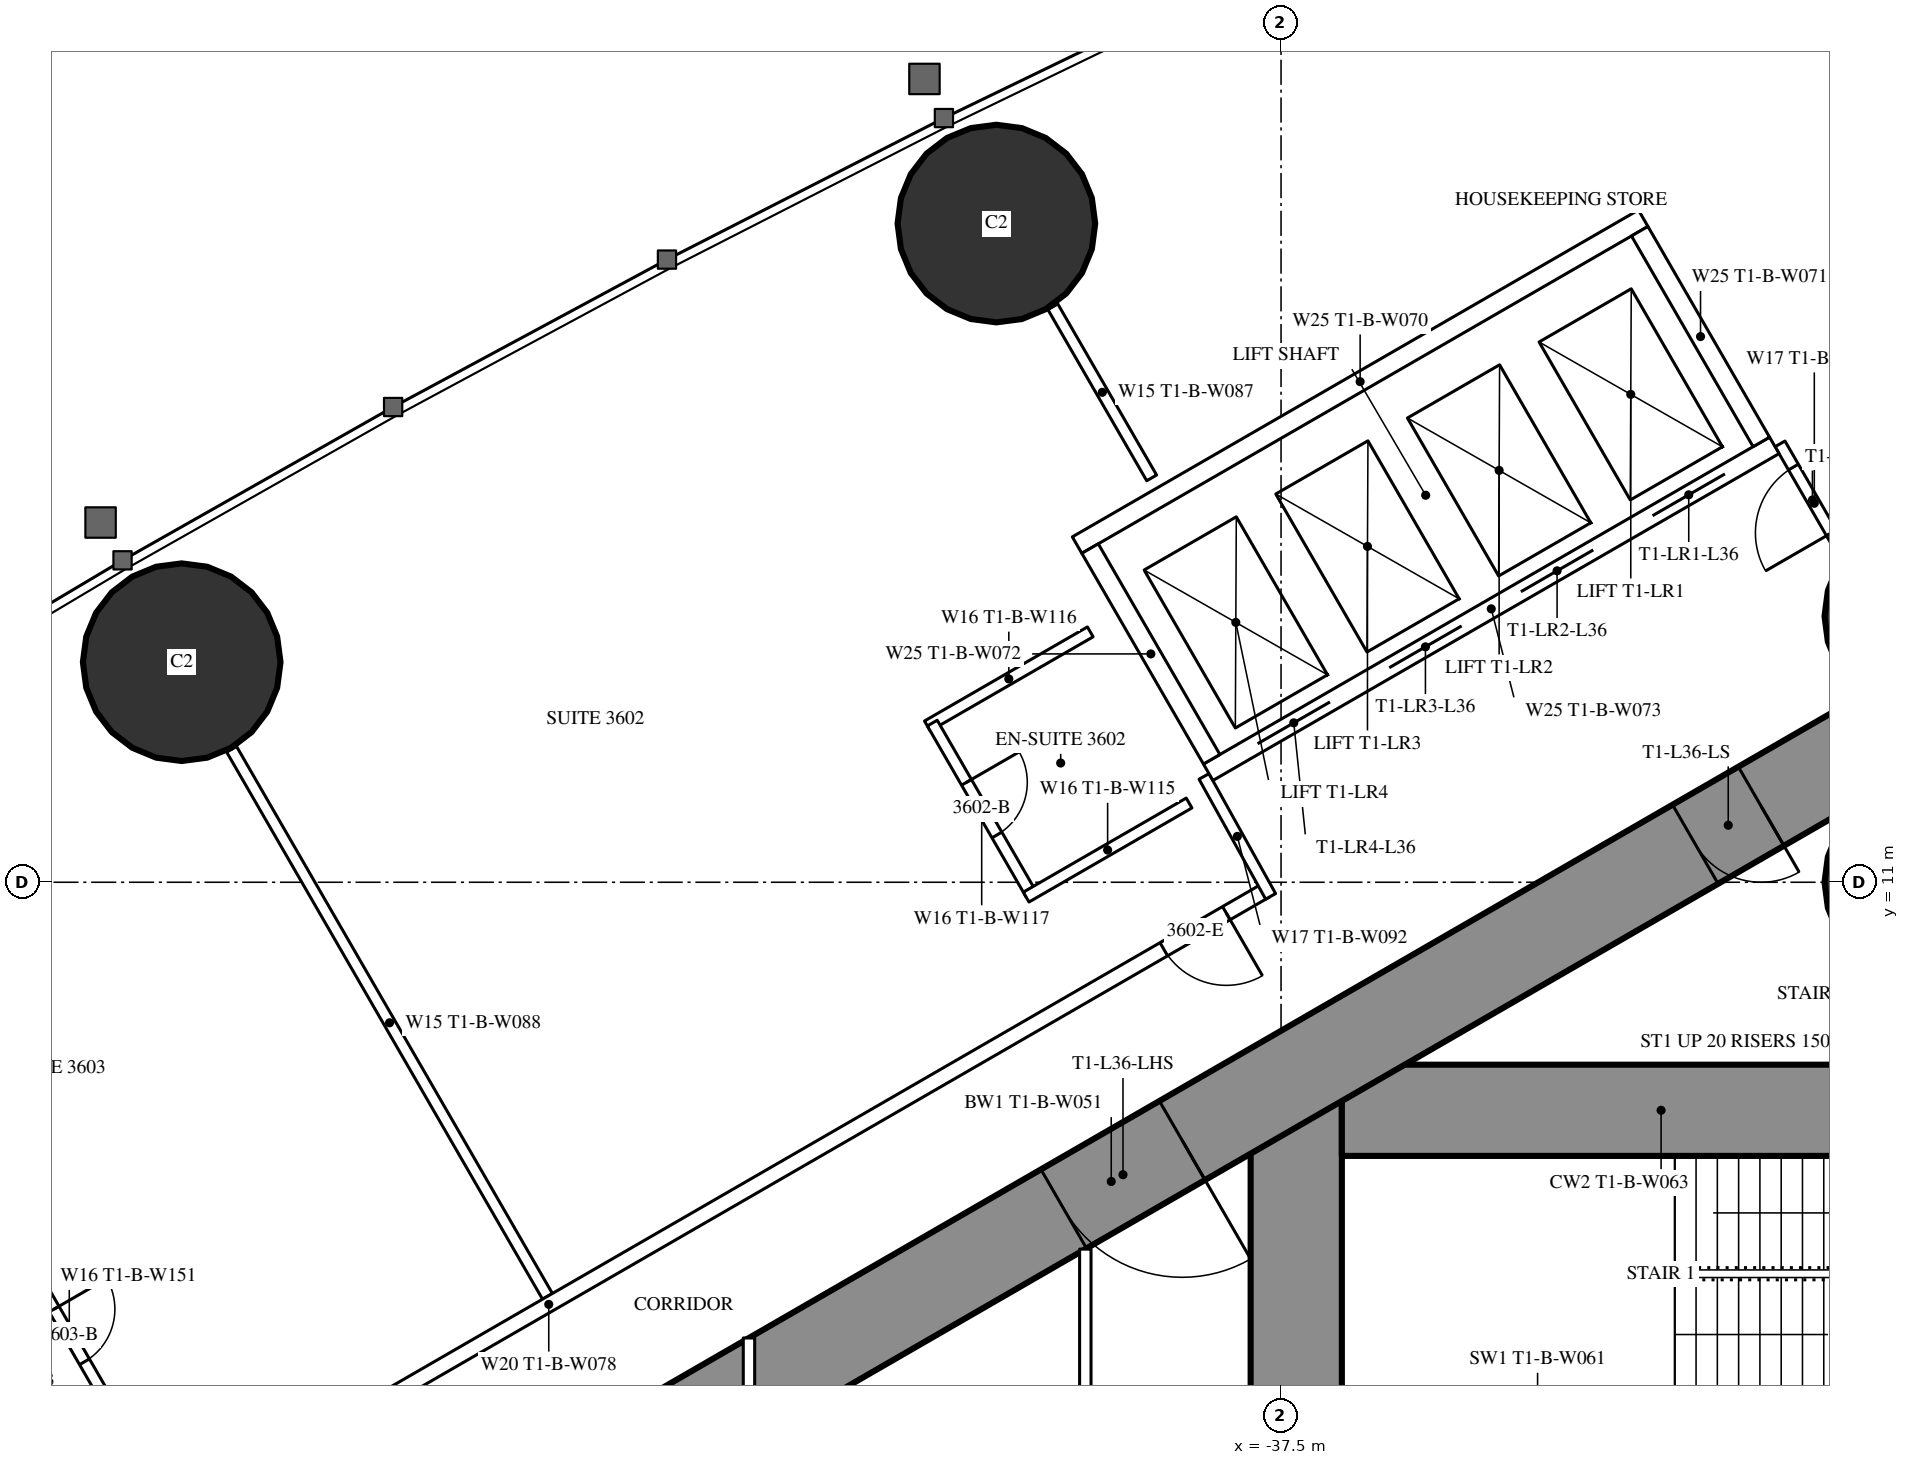
"""IFC4 building model, lengths in metres.
Left out: names, types, materials, properties, quantities, classifications, styles, units other than length and angle.
Written with IfcOpenShell. Run it as: python <this file> out.ifc"""

import sys

from ifc_helpers import new_model, si_unit, direction, frame, frame_2d, origin, origin_2d, place, context, subcontext, project, spatial, rectangle, hollow_circle, extrude, element, fill, save


model = new_model("IFC4")
c1 = context("Model", 3, precision=1e-05, world=origin(), true_north=direction((0.0, 1.0)))
c2 = subcontext(c1, "Body", "Model", "MODEL_VIEW")
j1 = project(units=[si_unit("LENGTHUNIT", "METRE"), si_unit("PLANEANGLEUNIT", "RADIAN")], contexts=[c1])
p1 = place(None, origin())
s1 = spatial("IfcSite", under=j1, at=p1, CompositionType="ELEMENT")
p2 = place(p1, origin())
s2 = spatial("IfcBuilding", under=s1, at=p2, CompositionType="ELEMENT")
p3 = place(p2, frame((0.0, 0.0, 136.1)))
s3 = spatial("IfcBuildingStorey", under=s2, at=p3, CompositionType="ELEMENT", Elevation=136.1)
for number, where, z_axis, x_axis in (
    (1, (-29.05, 11.0, 0.0), (0.0, 0.0, 1.0), (1.0, 0.0, 0.0)),
    (2, (-29.05, 14.5, 0.0), (0.0, 0.0, 1.0), (1.0, 0.0, 0.0)),
    (3, (-41.245, 19.666, 0.0), (0.0, 0.0, 1.0), (1.0, 0.0, 0.0)),
    (4, (-51.963, 13.895, 0.0), (0.0, 0.0, 1.0), (1.0, 0.0, 0.0)),
):
    element("IfcColumn", number, at=place(p3, frame(where, z_axis=z_axis, x_axis=x_axis)), inside=s3, PredefinedType="COLUMN", context=c2, shape_type="SweptSolid", body=[
        extrude(hollow_circle(Radius=1.3, WallThickness=0.1, at=origin_2d()), origin(), (0.0, 0.0, 1.0), 3.5),
    ])
p4 = place(p3, frame((-37.3, 8.6, 0.0), z_axis=(0.0, 0.0, 1.0), x_axis=(0.0, -1.0, 0.0)))
e5 = element("IfcWall", 5, at=p4, inside=s3, PredefinedType="SHEAR", context=c2, shape_type="SweptSolid", body=[
    extrude(rectangle(XDim=17.2, YDim=1.2, at=frame_2d((8.6, 0.0))), origin(), (0.0, 0.0, 1.0), 3.5),
])
p5 = place(p4, frame((7.7, 0.0, 0.0)))
e6 = element("IfcOpeningElement", 6, at=p5, cuts=e5, PredefinedType="OPENING", context=c2, shape_type="SweptSolid", body=[
    extrude(rectangle(XDim=1.8, YDim=2.2, at=frame_2d((0.9, 1.1))), frame((0.0, 0.61, 0.0), z_axis=(0.0, -1.0, 0.0), x_axis=(1.0, 0.0, 0.0)), (0.0, 0.0, 1.0), 1.22),
])
p6 = place(p3, frame((-28.3, 8.0, 0.0), z_axis=(0.0, 0.0, 1.0), x_axis=(-1.0, 0.0, 0.0)))
e7 = element("IfcWall", 7, at=p6, inside=s3, PredefinedType="SHEAR", context=c2, shape_type="SweptSolid", body=[
    extrude(rectangle(XDim=8.4, YDim=1.2, at=frame_2d((4.2, 0.0))), origin(), (0.0, 0.0, 1.0), 3.5),
])
p7 = place(p6, frame((0.25, 0.0, 0.0)))
e8 = element("IfcOpeningElement", 8, at=p7, cuts=e7, PredefinedType="OPENING", context=c2, shape_type="SweptSolid", body=[
    extrude(rectangle(XDim=1.0, YDim=2.2, at=frame_2d((0.5, 1.1))), frame((0.0, 0.61, 0.0), z_axis=(0.0, -1.0, 0.0), x_axis=(1.0, 0.0, 0.0)), (0.0, 0.0, 1.0), 1.22),
])
p8 = place(p3, frame((-27.2, 14.3, 0.0), z_axis=(0.0, 0.0, 1.0), x_axis=(-0.866026593062, -0.499997940104, 0.0)))
e9 = element("IfcWall", 9, at=p8, inside=s3, PredefinedType="SHEAR", context=c2, shape_type="SweptSolid", body=[
    extrude(rectangle(XDim=28.946, YDim=1.2, at=frame_2d((14.473, 0.0))), origin(), (0.0, 0.0, 1.0), 3.5),
])
p9 = place(p8, frame((4.6, 0.0, 0.0)))
e10 = element("IfcOpeningElement", 10, at=p9, cuts=e9, PredefinedType="OPENING", context=c2, shape_type="SweptSolid", body=[
    extrude(rectangle(XDim=1.0, YDim=2.2, at=frame_2d((0.5, 1.1))), frame((0.0, 0.61, 0.0), z_axis=(0.0, -1.0, 0.0), x_axis=(1.0, 0.0, 0.0)), (0.0, 0.0, 1.0), 1.22),
])
p10 = place(p8, frame((13.395, 0.0, 0.0)))
e11 = element("IfcOpeningElement", 11, at=p10, cuts=e9, PredefinedType="OPENING", context=c2, shape_type="SweptSolid", body=[
    extrude(rectangle(XDim=1.8, YDim=2.2, at=frame_2d((0.9, 1.1))), frame((0.0, 0.61, 0.0), z_axis=(0.0, -1.0, 0.0), x_axis=(1.0, 0.0, 0.0)), (0.0, 0.0, 1.0), 1.22),
])
p11 = place(p3, frame((-47.151, 5.552, 0.0), z_axis=(0.0, 0.0, 1.0), x_axis=(-0.500003012045, 0.866023664773, 0.0)))
e12 = element("IfcWall", 12, at=p11, inside=s3, PredefinedType="PARTITIONING", context=c2, shape_type="SweptSolid", body=[
    extrude(rectangle(XDim=8.311, YDim=0.15, at=frame_2d((4.156, 0.0))), origin(), (0.0, 0.0, 1.0), 2.2),
])
p12 = place(p3, frame((-39.202, 16.32, 0.0), z_axis=(0.0, 0.0, 1.0), x_axis=(-0.499947391036, 0.866055775454, 0.0)))
e13 = element("IfcWall", 13, at=p12, inside=s3, PredefinedType="PARTITIONING", context=c2, shape_type="SweptSolid", body=[
    extrude(rectangle(XDim=2.599, YDim=0.15, at=frame_2d((1.3, 0.0))), origin(), (0.0, 0.0, 1.0), 3.25),
])
p13 = place(p3, frame((-37.7, 10.894, 0.0), z_axis=(0.0, 0.0, 1.0), x_axis=(-0.866027905338, -0.499995667157, 0.0)))
e14 = element("IfcWall", 14, at=p13, inside=s3, PredefinedType="PARTITIONING", context=c2, shape_type="SweptSolid", body=[
    extrude(rectangle(XDim=21.787, YDim=0.2, at=frame_2d((10.894, 0.0))), origin(), (0.0, 0.0, 1.0), 3.25),
])
p14 = place(p13, frame((17.711, 0.0, 0.0)))
e15 = element("IfcOpeningElement", 15, at=p14, cuts=e14, PredefinedType="OPENING", context=c2, shape_type="SweptSolid", body=[
    extrude(rectangle(XDim=0.95, YDim=2.2, at=frame_2d((0.475, 1.1))), frame((0.0, 0.11, 0.0), z_axis=(0.0, -1.0, 0.0), x_axis=(1.0, 0.0, 0.0)), (0.0, 0.0, 1.0), 0.22),
])
p15 = place(p13, frame((19.399, 0.0, 0.0)))
e16 = element("IfcOpeningElement", 16, at=p15, cuts=e14, PredefinedType="OPENING", context=c2, shape_type="SweptSolid", body=[
    extrude(rectangle(XDim=1.8, YDim=2.2, at=frame_2d((0.9, 1.1))), frame((0.0, 0.11, 0.0), z_axis=(0.0, -1.0, 0.0), x_axis=(1.0, 0.0, 0.0)), (0.0, 0.0, 1.0), 0.22),
])
p16 = place(p13, frame((0.6, 0.0, 0.0)))
e17 = element("IfcOpeningElement", 17, at=p16, cuts=e14, PredefinedType="OPENING", context=c2, shape_type="SweptSolid", body=[
    extrude(rectangle(XDim=0.95, YDim=2.2, at=frame_2d((0.475, 1.1))), frame((0.0, 0.11, 0.0), z_axis=(0.0, -1.0, 0.0), x_axis=(1.0, 0.0, 0.0)), (0.0, 0.0, 1.0), 0.22),
])
p17 = place(p3, frame((-38.513, 12.392, 0.0), z_axis=(0.0, 0.0, 1.0), x_axis=(0.485585508183, -0.874189175317, 0.0)))
e18 = element("IfcWall", 18, at=p17, inside=s3, PredefinedType="PARTITIONING", context=c2, shape_type="SweptSolid", body=[
    extrude(rectangle(XDim=1.805, YDim=0.15, at=frame_2d((0.902, 0.0))), origin(), (0.0, 0.0, 1.0), 3.25),
])
p18 = place(p3, frame((-30.033, 15.205, 0.0), z_axis=(0.0, 0.0, 1.0), x_axis=(-0.499980071345, 0.866036909293, 0.0)))
e19 = element("IfcWall", 19, at=p18, inside=s3, PredefinedType="PARTITIONING", context=c2, shape_type="SweptSolid", body=[
    extrude(rectangle(XDim=1.805, YDim=0.15, at=frame_2d((0.902, 0.0))), origin(), (0.0, 0.0, 1.0), 2.2),
])
p19 = place(p18, frame((0.452, 0.0, 0.0)))
e20 = element("IfcOpeningElement", 20, at=p19, cuts=e19, PredefinedType="OPENING", context=c2, shape_type="SweptSolid", body=[
    extrude(rectangle(XDim=1.0, YDim=2.2, at=frame_2d((0.5, 1.1))), frame((0.0, 0.085, 0.0), z_axis=(0.0, -1.0, 0.0), x_axis=(1.0, 0.0, 0.0)), (0.0, 0.0, 1.0), 0.17),
])
p20 = place(p3, frame((-52.792, 3.912, 0.0), z_axis=(0.0, 0.0, 1.0), x_axis=(-0.500006934395, 0.866021400173, 0.0)))
e21 = element("IfcWall", 21, at=p20, inside=s3, PredefinedType="PARTITIONING", context=c2, shape_type="SweptSolid", body=[
    extrude(rectangle(XDim=2.6, YDim=0.15, at=frame_2d((1.3, 0.0))), origin(), (0.0, 0.0, 1.0), 3.25),
])
p21 = place(p20, frame((0.9, 0.0, 0.0)))
e22 = element("IfcOpeningElement", 22, at=p21, cuts=e21, PredefinedType="OPENING", context=c2, shape_type="SweptSolid", body=[
    extrude(rectangle(XDim=0.8, YDim=2.2, at=frame_2d((0.4, 1.1))), frame((0.0, 0.085, 0.0), z_axis=(0.0, -1.0, 0.0), x_axis=(1.0, 0.0, 0.0)), (0.0, 0.0, 1.0), 0.17),
])
p22 = place(p3, frame((-40.01, 14.294, 0.0), z_axis=(0.0, 0.0, 1.0), x_axis=(-0.866031185235, -0.4999899861, 0.0)))
e23 = element("IfcWall", 23, at=p22, inside=s3, PredefinedType="PARTITIONING", context=c2, shape_type="SweptSolid", body=[
    extrude(rectangle(XDim=2.475, YDim=0.15, at=frame_2d((1.238, 0.0))), origin(), (0.0, 0.0, 1.0), 3.25),
])
p23 = place(p3, frame((-40.788, 10.843, 0.0), z_axis=(0.0, 0.0, 1.0), x_axis=(-0.500006934395, 0.866021400173, 0.0)))
e24 = element("IfcWall", 24, at=p23, inside=s3, PredefinedType="PARTITIONING", context=c2, shape_type="SweptSolid", body=[
    extrude(rectangle(XDim=2.6, YDim=0.15, at=frame_2d((1.3, 0.0))), origin(), (0.0, 0.0, 1.0), 3.25),
])
p24 = place(p23, frame((0.9, 0.0, 0.0)))
e25 = element("IfcOpeningElement", 25, at=p24, cuts=e24, PredefinedType="OPENING", context=c2, shape_type="SweptSolid", body=[
    extrude(rectangle(XDim=0.8, YDim=2.2, at=frame_2d((0.4, 1.1))), frame((0.0, 0.085, 0.0), z_axis=(0.0, -1.0, 0.0), x_axis=(1.0, 0.0, 0.0)), (0.0, 0.0, 1.0), 0.17),
])
p25 = place(p3, frame((-38.71, 12.042, 0.0), z_axis=(0.0, 0.0, 1.0), x_axis=(-0.86604923931, -0.499958713387, 0.0)))
e26 = element("IfcWall", 26, at=p25, inside=s3, PredefinedType="PARTITIONING", context=c2, shape_type="SweptSolid", body=[
    extrude(rectangle(XDim=2.475, YDim=0.15, at=frame_2d((1.237, 0.0))), origin(), (0.0, 0.0, 1.0), 3.25),
])
p26 = place(p3, frame((-40.075, 6.174, 0.0), z_axis=(0.0, 0.0, 1.0), x_axis=(0.0, -1.0, 0.0)))
e27 = element("IfcWall", 27, at=p26, inside=s3, PredefinedType="PARTITIONING", context=c2, shape_type="SweptSolid", body=[
    extrude(rectangle(XDim=7.374, YDim=0.15, at=frame_2d((3.687, 0.0))), origin(), (0.0, 0.0, 1.0), 3.25),
])
p27 = place(p26, frame((2.787, 0.0, 0.0)))
e28 = element("IfcOpeningElement", 28, at=p27, cuts=e27, PredefinedType="OPENING", context=c2, shape_type="SweptSolid", body=[
    extrude(rectangle(XDim=1.8, YDim=2.2, at=frame_2d((0.9, 1.1))), frame((0.0, 0.085, 0.0), z_axis=(0.0, -1.0, 0.0), x_axis=(1.0, 0.0, 0.0)), (0.0, 0.0, 1.0), 0.17),
])
p28 = place(p3, frame((-44.5, 5.005, 0.0), z_axis=(0.0, 0.0, 1.0), x_axis=(0.0, -1.0, 0.0)))
e29 = element("IfcWall", 29, at=p28, inside=s3, PredefinedType="PARTITIONING", context=c2, shape_type="SweptSolid", body=[
    extrude(rectangle(XDim=10.009, YDim=0.15, at=frame_2d((5.005, 0.0))), origin(), (0.0, 0.0, 1.0), 2.45),
])
p29 = place(p28, frame((4.505, 0.0, 0.0)))
e30 = element("IfcOpeningElement", 30, at=p29, cuts=e29, PredefinedType="OPENING", context=c2, shape_type="SweptSolid", body=[
    extrude(rectangle(XDim=1.0, YDim=2.2, at=frame_2d((0.5, 1.1))), frame((0.0, 0.085, 0.0), z_axis=(0.0, -1.0, 0.0), x_axis=(1.0, 0.0, 0.0)), (0.0, 0.0, 1.0), 0.17),
])
p30 = place(p3, frame((-31.01, 16.747, 0.0), z_axis=(0.0, 0.0, 1.0), x_axis=(-0.866028165386, -0.499995216735, 0.0)))
e31 = element("IfcWall", 31, at=p30, inside=s3, PredefinedType="PARTITIONING", context=c2, shape_type="SweptSolid", body=[
    extrude(rectangle(XDim=8.6, YDim=0.25, at=frame_2d((4.3, 0.0))), origin(), (0.0, 0.0, 1.0), 3.25),
])
p31 = place(p30, frame((0.75, 0.0, 0.0)))
e32 = element("IfcOpeningElement", 32, at=p31, cuts=e31, PredefinedType="OPENING", context=c2, shape_type="SweptSolid", body=[
    extrude(rectangle(XDim=1.1, YDim=2.2, at=frame_2d((0.55, 1.1))), frame((0.0, 0.135, 0.0), z_axis=(0.0, -1.0, 0.0), x_axis=(1.0, 0.0, 0.0)), (0.0, 0.0, 1.0), 0.27),
])
p32 = place(p30, frame((2.75, 0.0, 0.0)))
e33 = element("IfcOpeningElement", 33, at=p32, cuts=e31, PredefinedType="OPENING", context=c2, shape_type="SweptSolid", body=[
    extrude(rectangle(XDim=1.1, YDim=2.2, at=frame_2d((0.55, 1.1))), frame((0.0, 0.135, 0.0), z_axis=(0.0, -1.0, 0.0), x_axis=(1.0, 0.0, 0.0)), (0.0, 0.0, 1.0), 0.27),
])
p33 = place(p30, frame((4.75, 0.0, 0.0)))
e34 = element("IfcOpeningElement", 34, at=p33, cuts=e31, PredefinedType="OPENING", context=c2, shape_type="SweptSolid", body=[
    extrude(rectangle(XDim=1.1, YDim=2.2, at=frame_2d((0.55, 1.1))), frame((0.0, 0.135, 0.0), z_axis=(0.0, -1.0, 0.0), x_axis=(1.0, 0.0, 0.0)), (0.0, 0.0, 1.0), 0.27),
])
p34 = place(p30, frame((6.75, 0.0, 0.0)))
e35 = element("IfcOpeningElement", 35, at=p34, cuts=e31, PredefinedType="OPENING", context=c2, shape_type="SweptSolid", body=[
    extrude(rectangle(XDim=1.1, YDim=2.2, at=frame_2d((0.55, 1.1))), frame((0.0, 0.135, 0.0), z_axis=(0.0, -1.0, 0.0), x_axis=(1.0, 0.0, 0.0)), (0.0, 0.0, 1.0), 0.27),
])
p35 = place(p3, frame((-32.736, 19.736, 0.0), z_axis=(0.0, 0.0, 1.0), x_axis=(-0.866028165386, -0.499995216735, 0.0)))
e36 = element("IfcWall", 36, at=p35, inside=s3, PredefinedType="PARTITIONING", context=c2, shape_type="SweptSolid", body=[
    extrude(rectangle(XDim=8.6, YDim=0.25, at=frame_2d((4.3, 0.0))), origin(), (0.0, 0.0, 1.0), 3.25),
])
p36 = place(p3, frame((-31.181, 16.793, 0.0), z_axis=(0.0, 0.0, 1.0), x_axis=(-0.499929347863, 0.866066190972, 0.0)))
e37 = element("IfcWall", 37, at=p36, inside=s3, PredefinedType="PARTITIONING", context=c2, shape_type="SweptSolid", body=[
    extrude(rectangle(XDim=3.201, YDim=0.25, at=frame_2d((1.6, 0.0))), origin(), (0.0, 0.0, 1.0), 3.25),
])
p37 = place(p3, frame((-38.413, 12.618, 0.0), z_axis=(0.0, 0.0, 1.0), x_axis=(-0.499872130319, 0.866099216793, 0.0)))
e38 = element("IfcWall", 38, at=p37, inside=s3, PredefinedType="PARTITIONING", context=c2, shape_type="SweptSolid", body=[
    extrude(rectangle(XDim=3.2, YDim=0.25, at=frame_2d((1.6, 0.0))), origin(), (0.0, 0.0, 1.0), 3.25),
])
p38 = place(p21, origin())
e39 = element("IfcDoor", 39, at=p38, inside=s3, OperationType="SINGLE_SWING_RIGHT", PredefinedType="DOOR", context=c2, shape_type="SweptSolid", body=[
    extrude(rectangle(XDim=0.8, YDim=2.2, at=frame_2d((0.4, 1.1))), frame((0.0, 0.025, 0.0), z_axis=(0.0, -1.0, 0.0), x_axis=(1.0, 0.0, 0.0)), (0.0, 0.0, 1.0), 0.05),
])
fill(e22, e39)
p39 = place(p24, origin())
e40 = element("IfcDoor", 40, at=p39, inside=s3, OperationType="SINGLE_SWING_RIGHT", PredefinedType="DOOR", context=c2, shape_type="SweptSolid", body=[
    extrude(rectangle(XDim=0.8, YDim=2.2, at=frame_2d((0.4, 1.1))), frame((0.0, 0.025, 0.0), z_axis=(0.0, -1.0, 0.0), x_axis=(1.0, 0.0, 0.0)), (0.0, 0.0, 1.0), 0.05),
])
fill(e25, e40)
p40 = place(p16, origin())
e41 = element("IfcDoor", 41, at=p40, inside=s3, OperationType="SINGLE_SWING_LEFT", PredefinedType="DOOR", context=c2, shape_type="SweptSolid", body=[
    extrude(rectangle(XDim=0.95, YDim=2.2, at=frame_2d((0.475, 1.1))), frame((0.0, 0.025, 0.0), z_axis=(0.0, -1.0, 0.0), x_axis=(1.0, 0.0, 0.0)), (0.0, 0.0, 1.0), 0.05),
])
fill(e17, e41)
p41 = place(p19, origin())
e42 = element("IfcDoor", 42, at=p41, inside=s3, OperationType="SINGLE_SWING_LEFT", PredefinedType="DOOR", context=c2, shape_type="SweptSolid", body=[
    extrude(rectangle(XDim=1.0, YDim=2.2, at=frame_2d((0.5, 1.1))), frame((0.0, 0.025, 0.0), z_axis=(0.0, -1.0, 0.0), x_axis=(1.0, 0.0, 0.0)), (0.0, 0.0, 1.0), 0.05),
])
fill(e20, e42)
p42 = place(p9, origin())
e43 = element("IfcDoor", 43, at=p42, inside=s3, OperationType="SINGLE_SWING_LEFT", PredefinedType="DOOR", context=c2, shape_type="SweptSolid", body=[
    extrude(rectangle(XDim=1.0, YDim=2.2, at=frame_2d((0.5, 1.1))), frame((0.0, 0.025, 0.0), z_axis=(0.0, -1.0, 0.0), x_axis=(1.0, 0.0, 0.0)), (0.0, 0.0, 1.0), 0.05),
])
fill(e10, e43)
p43 = place(p10, origin())
e44 = element("IfcDoor", 44, at=p43, inside=s3, OperationType="DOUBLE_DOOR_SINGLE_SWING", PredefinedType="DOOR", context=c2, shape_type="SweptSolid", body=[
    extrude(rectangle(XDim=1.8, YDim=2.2, at=frame_2d((0.9, 1.1))), frame((0.0, 0.025, 0.0), z_axis=(0.0, -1.0, 0.0), x_axis=(1.0, 0.0, 0.0)), (0.0, 0.0, 1.0), 0.05),
])
fill(e11, e44)
p44 = place(p31, origin())
e45 = element("IfcDoor", 45, at=p44, inside=s3, OperationType="DOUBLE_DOOR_SLIDING", PredefinedType="USERDEFINED", context=c2, shape_type="SweptSolid", body=[
    extrude(rectangle(XDim=1.1, YDim=2.2, at=frame_2d((0.55, 1.1))), frame((0.0, 0.025, 0.0), z_axis=(0.0, -1.0, 0.0), x_axis=(1.0, 0.0, 0.0)), (0.0, 0.0, 1.0), 0.05),
])
fill(e32, e45)
p45 = place(p32, origin())
e46 = element("IfcDoor", 46, at=p45, inside=s3, OperationType="DOUBLE_DOOR_SLIDING", PredefinedType="USERDEFINED", context=c2, shape_type="SweptSolid", body=[
    extrude(rectangle(XDim=1.1, YDim=2.2, at=frame_2d((0.55, 1.1))), frame((0.0, 0.025, 0.0), z_axis=(0.0, -1.0, 0.0), x_axis=(1.0, 0.0, 0.0)), (0.0, 0.0, 1.0), 0.05),
])
fill(e33, e46)
p46 = place(p33, origin())
e47 = element("IfcDoor", 47, at=p46, inside=s3, OperationType="DOUBLE_DOOR_SLIDING", PredefinedType="USERDEFINED", context=c2, shape_type="SweptSolid", body=[
    extrude(rectangle(XDim=1.1, YDim=2.2, at=frame_2d((0.55, 1.1))), frame((0.0, 0.025, 0.0), z_axis=(0.0, -1.0, 0.0), x_axis=(1.0, 0.0, 0.0)), (0.0, 0.0, 1.0), 0.05),
])
fill(e34, e47)
p47 = place(p34, origin())
e48 = element("IfcDoor", 48, at=p47, inside=s3, OperationType="DOUBLE_DOOR_SLIDING", PredefinedType="USERDEFINED", context=c2, shape_type="SweptSolid", body=[
    extrude(rectangle(XDim=1.1, YDim=2.2, at=frame_2d((0.55, 1.1))), frame((0.0, 0.025, 0.0), z_axis=(0.0, -1.0, 0.0), x_axis=(1.0, 0.0, 0.0)), (0.0, 0.0, 1.0), 0.05),
])
fill(e35, e48)
save(model, sys.argv[1])
